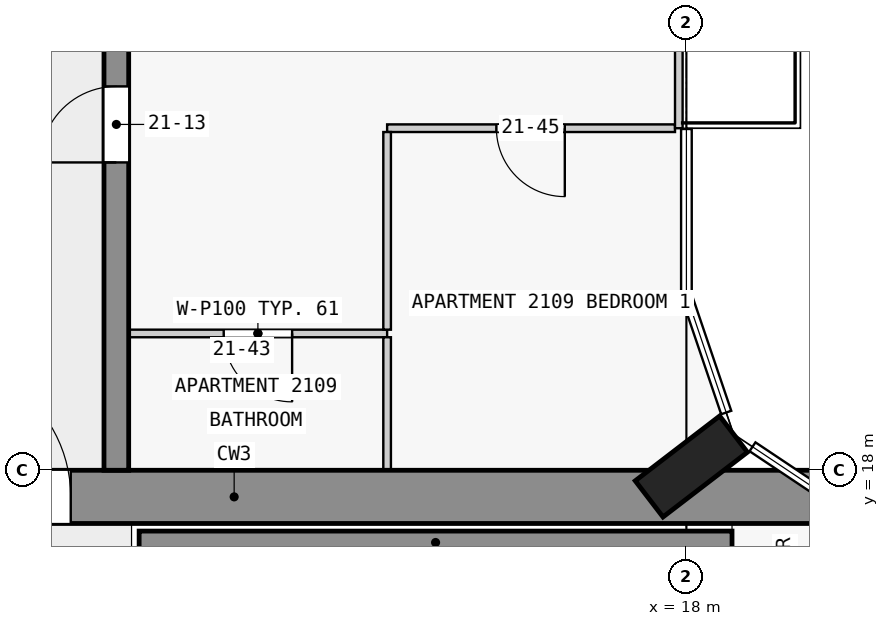
"""IFC4 building model, lengths in metres.
Left out: names, types, materials, properties, quantities, classifications, styles, units other than length and angle.
Written with IfcOpenShell. Run it as: python <this file> out.ifc"""

import sys

from ifc_helpers import new_model, si_unit, direction, frame, frame_2d, origin, origin_2d, place, context, subcontext, project, spatial, rectangle, extrude, element, fill, save


model = new_model("IFC4")
c1 = context("Model", 3, precision=1e-05, world=origin(), true_north=direction((0.0, 1.0)))
c2 = subcontext(c1, "Body", "Model", "MODEL_VIEW")
j1 = project(units=[si_unit("LENGTHUNIT", "METRE"), si_unit("PLANEANGLEUNIT", "RADIAN")], contexts=[c1])
p1 = place(None, origin())
s1 = spatial("IfcSite", under=j1, at=p1, CompositionType="ELEMENT")
p2 = place(p1, origin())
s2 = spatial("IfcBuilding", under=s1, at=p2, CompositionType="ELEMENT")
p3 = place(p2, frame((0.0, 0.0, 85.3)))
s3 = spatial("IfcBuildingStorey", under=s2, at=p3, CompositionType="ELEMENT", Elevation=85.3)
p4 = place(p3, frame((18.065, 18.05, 0.0), z_axis=(0.0, 0.0, 1.0), x_axis=(-0.608810846443, 0.793315418515, 0.0)))
e1 = element("IfcColumn", 1, at=p4, inside=s3, PredefinedType="COLUMN", context=c2, shape_type="SweptSolid", body=[
    extrude(rectangle(XDim=0.6, YDim=1.4, at=origin_2d()), origin(), (0.0, 0.0, 1.0), 3.5),
])
p5 = place(p3, frame((1.6, 17.65, 0.0), z_axis=(0.0, 0.0, 1.0), x_axis=(1.0, 0.0, 0.0)))
e2 = element("IfcWall", 2, at=p5, inside=s3, PredefinedType="SHEAR", context=c2, shape_type="SweptSolid", body=[
    extrude(rectangle(XDim=20.9, YDim=0.7, at=frame_2d((10.45, 0.0))), origin(), (0.0, 0.0, 1.0), 3.25),
])
p6 = place(p5, frame((6.5, 0.0, 0.0)))
e3 = element("IfcOpeningElement", 3, at=p6, cuts=e2, PredefinedType="OPENING", context=c2, shape_type="SweptSolid", body=[
    extrude(rectangle(XDim=1.8, YDim=2.1, at=frame_2d((0.9, 1.05))), frame((0.0, 0.36, 0.0), z_axis=(0.0, -1.0, 0.0), x_axis=(1.0, 0.0, 0.0)), (0.0, 0.0, 1.0), 0.72),
])
p7 = place(p3, frame((10.8, 17.05, 0.0), z_axis=(0.0, 0.0, 1.0), x_axis=(1.0, 0.0, 0.0)))
e4 = element("IfcWall", 4, at=p7, inside=s3, PredefinedType="SHEAR", context=c2, shape_type="SweptSolid", body=[
    extrude(rectangle(XDim=7.8, YDim=0.3, at=frame_2d((3.9, 0.0))), origin(), (0.0, 0.0, 1.0), 3.25),
])
p8 = place(p3, frame((10.5, 18.0, 0.0), z_axis=(0.0, 0.0, 1.0), x_axis=(0.0, 1.0, 0.0)))
e5 = element("IfcWall", 5, at=p8, inside=s3, PredefinedType="SHEAR", context=c2, shape_type="SweptSolid", body=[
    extrude(rectangle(XDim=27.0, YDim=0.325, at=frame_2d((13.5, 0.0))), origin(), (0.0, 0.0, 1.0), 3.25),
])
p9 = place(p8, frame((4.05, 0.0, 0.0)))
e6 = element("IfcOpeningElement", 6, at=p9, cuts=e5, PredefinedType="OPENING", context=c2, shape_type="SweptSolid", body=[
    extrude(rectangle(XDim=1.0, YDim=2.1, at=frame_2d((0.5, 1.05))), frame((0.0, 0.172, 0.0), z_axis=(0.0, -1.0, 0.0), x_axis=(1.0, 0.0, 0.0)), (0.0, 0.0, 1.0), 0.345),
])
p10 = place(p8, frame((13.05, 0.0, 0.0)))
e7 = element("IfcOpeningElement", 7, at=p10, cuts=e5, PredefinedType="OPENING", context=c2, shape_type="SweptSolid", body=[
    extrude(rectangle(XDim=1.0, YDim=2.1, at=frame_2d((0.5, 1.05))), frame((0.0, 0.172, 0.0), z_axis=(0.0, -1.0, 0.0), x_axis=(1.0, 0.0, 0.0)), (0.0, 0.0, 1.0), 0.345),
])
p11 = place(p8, frame((19.75, 0.0, 0.0)))
e8 = element("IfcOpeningElement", 8, at=p11, cuts=e5, PredefinedType="OPENING", context=c2, shape_type="SweptSolid", body=[
    extrude(rectangle(XDim=1.0, YDim=2.1, at=frame_2d((0.5, 1.05))), frame((0.0, 0.172, 0.0), z_axis=(0.0, -1.0, 0.0), x_axis=(1.0, 0.0, 0.0)), (0.0, 0.0, 1.0), 0.345),
])
p12 = place(p8, frame((23.25, 0.0, 0.0)))
e9 = element("IfcOpeningElement", 9, at=p12, cuts=e5, PredefinedType="OPENING", context=c2, shape_type="SweptSolid", body=[
    extrude(rectangle(XDim=0.9, YDim=2.1, at=frame_2d((0.45, 1.05))), frame((0.0, 0.172, 0.0), z_axis=(0.0, -1.0, 0.0), x_axis=(1.0, 0.0, 0.0)), (0.0, 0.0, 1.0), 0.345),
])
p13 = place(p8, frame((25.45, 0.0, 0.0)))
e10 = element("IfcOpeningElement", 10, at=p13, cuts=e5, PredefinedType="OPENING", context=c2, shape_type="SweptSolid", body=[
    extrude(rectangle(XDim=1.0, YDim=2.1, at=frame_2d((0.5, 1.05))), frame((0.0, 0.172, 0.0), z_axis=(0.0, -1.0, 0.0), x_axis=(1.0, 0.0, 0.0)), (0.0, 0.0, 1.0), 0.345),
])
p14 = place(p3, frame((17.9, 27.0, 0.0), z_axis=(0.0, 0.0, 1.0), x_axis=(0.0, -1.0, 0.0)))
e11 = element("IfcWall", 11, at=p14, inside=s3, PredefinedType="STANDARD", context=c2, shape_type="SweptSolid", body=[
    extrude(rectangle(XDim=4.5, YDim=0.1, at=frame_2d((2.25, 0.0))), origin(), (0.0, 0.0, 1.0), 3.25),
])
p15 = place(p14, frame((1.05, 0.0, 0.0)))
e12 = element("IfcOpeningElement", 12, at=p15, cuts=e11, PredefinedType="OPENING", context=c2, shape_type="SweptSolid", body=[
    extrude(rectangle(XDim=2.4, YDim=2.4, at=frame_2d((1.2, 1.2))), frame((0.0, 0.06, 0.0), z_axis=(0.0, -1.0, 0.0), x_axis=(1.0, 0.0, 0.0)), (0.0, 0.0, 1.0), 0.12),
])
p16 = place(p3, frame((14.062, 19.8, 0.0), z_axis=(0.0, 0.0, 1.0), x_axis=(-1.0, 0.0, 0.0)))
e13 = element("IfcWall", 13, at=p16, inside=s3, PredefinedType="PARTITIONING", context=c2, shape_type="SweptSolid", body=[
    extrude(rectangle(XDim=3.4, YDim=0.1, at=frame_2d((1.7, 0.0))), origin(), (0.0, 0.0, 1.0), 3.25),
])
p17 = place(p16, frame((1.25, 0.0, 0.0)))
e14 = element("IfcOpeningElement", 14, at=p17, cuts=e13, PredefinedType="OPENING", context=c2, shape_type="SweptSolid", body=[
    extrude(rectangle(XDim=0.9, YDim=2.1, at=frame_2d((0.45, 1.05))), frame((0.0, 0.06, 0.0), z_axis=(0.0, -1.0, 0.0), x_axis=(1.0, 0.0, 0.0)), (0.0, 0.0, 1.0), 0.12),
])
p18 = place(p3, frame((17.85, 22.5, 0.0), z_axis=(0.0, 0.0, 1.0), x_axis=(-1.0, 0.0, 0.0)))
e15 = element("IfcWall", 15, at=p18, inside=s3, PredefinedType="PARTITIONING", context=c2, shape_type="SweptSolid", body=[
    extrude(rectangle(XDim=3.788, YDim=0.1, at=frame_2d((1.894, 0.0))), origin(), (0.0, 0.0, 1.0), 3.25),
])
p19 = place(p18, frame((1.45, 0.0, 0.0)))
e16 = element("IfcOpeningElement", 16, at=p19, cuts=e15, PredefinedType="OPENING", context=c2, shape_type="SweptSolid", body=[
    extrude(rectangle(XDim=0.9, YDim=2.1, at=frame_2d((0.45, 1.05))), frame((0.0, 0.06, 0.0), z_axis=(0.0, -1.0, 0.0), x_axis=(1.0, 0.0, 0.0)), (0.0, 0.0, 1.0), 0.12),
])
p20 = place(p3, frame((14.062, 22.45, 0.0), z_axis=(0.0, 0.0, 1.0), x_axis=(0.0, -1.0, 0.0)))
e17 = element("IfcWall", 17, at=p20, inside=s3, PredefinedType="PARTITIONING", context=c2, shape_type="SweptSolid", body=[
    extrude(rectangle(XDim=2.6, YDim=0.1, at=frame_2d((1.3, 0.0))), origin(), (0.0, 0.0, 1.0), 3.25),
])
p21 = place(p3, frame((14.062, 18.0, 0.0), z_axis=(0.0, 0.0, 1.0), x_axis=(0.0, 1.0, 0.0)))
e18 = element("IfcWall", 18, at=p21, inside=s3, PredefinedType="PARTITIONING", context=c2, shape_type="SweptSolid", body=[
    extrude(rectangle(XDim=1.75, YDim=0.1, at=frame_2d((0.875, 0.0))), origin(), (0.0, 0.0, 1.0), 3.25),
])
p22 = place(p6, origin())
e19 = element("IfcDoor", 19, at=p22, inside=s3, OperationType="DOUBLE_DOOR_SINGLE_SWING", PredefinedType="DOOR", context=c2, shape_type="SweptSolid", body=[
    extrude(rectangle(XDim=1.8, YDim=2.1, at=frame_2d((0.9, 1.05))), frame((0.0, 0.025, 0.0), z_axis=(0.0, -1.0, 0.0), x_axis=(1.0, 0.0, 0.0)), (0.0, 0.0, 1.0), 0.05),
])
fill(e3, e19)
p23 = place(p9, origin())
e20 = element("IfcDoor", 20, at=p23, inside=s3, OperationType="SINGLE_SWING_LEFT", PredefinedType="DOOR", context=c2, shape_type="SweptSolid", body=[
    extrude(rectangle(XDim=1.0, YDim=2.1, at=frame_2d((0.5, 1.05))), frame((0.0, 0.025, 0.0), z_axis=(0.0, -1.0, 0.0), x_axis=(1.0, 0.0, 0.0)), (0.0, 0.0, 1.0), 0.05),
])
fill(e6, e20)
p24 = place(p17, origin())
e21 = element("IfcDoor", 21, at=p24, inside=s3, OperationType="SINGLE_SWING_LEFT", PredefinedType="DOOR", context=c2, shape_type="SweptSolid", body=[
    extrude(rectangle(XDim=0.9, YDim=2.1, at=frame_2d((0.45, 1.05))), frame((0.0, 0.025, 0.0), z_axis=(0.0, -1.0, 0.0), x_axis=(1.0, 0.0, 0.0)), (0.0, 0.0, 1.0), 0.05),
])
fill(e14, e21)
p25 = place(p19, origin())
e22 = element("IfcDoor", 22, at=p25, inside=s3, OperationType="SINGLE_SWING_RIGHT", PredefinedType="DOOR", context=c2, shape_type="SweptSolid", body=[
    extrude(rectangle(XDim=0.9, YDim=2.1, at=frame_2d((0.45, 1.05))), frame((0.0, 0.025, 0.0), z_axis=(0.0, -1.0, 0.0), x_axis=(1.0, 0.0, 0.0)), (0.0, 0.0, 1.0), 0.05),
])
fill(e16, e22)
save(model, sys.argv[1])
